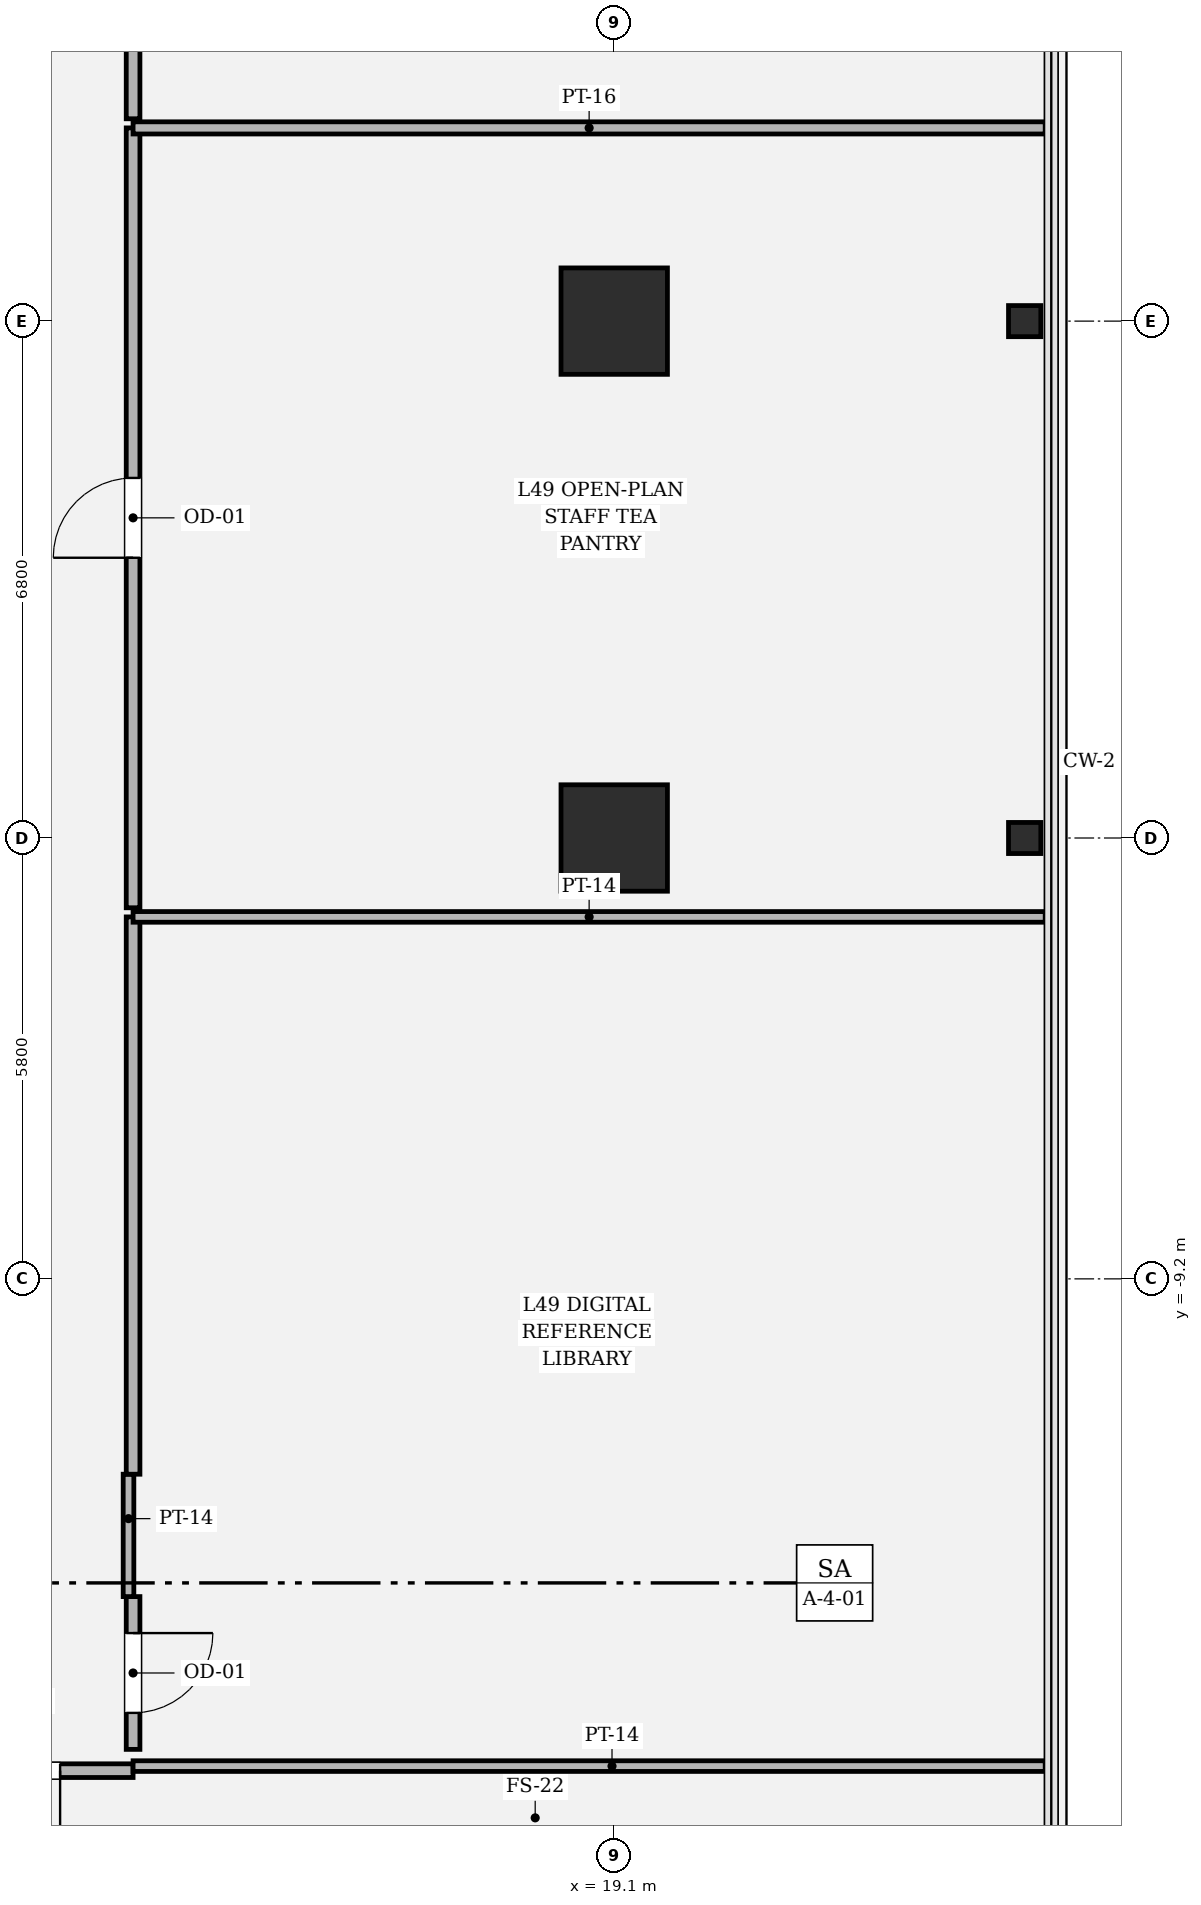
"""IFC4 building model, lengths in metres.
Left out: names, types, materials, properties, quantities, classifications, styles, units other than length and angle.
Written with IfcOpenShell. Run it as: python <this file> out.ifc"""

import sys

from ifc_helpers import new_model, si_unit, direction, frame, frame_2d, origin, origin_2d, place, context, subcontext, project, spatial, rectangle, hollow_rectangle, i_section, extrude, element, fill, save


model = new_model("IFC4")
c1 = context("Model", 3, precision=1e-05, world=origin(), true_north=direction((0.0, 1.0)))
c2 = subcontext(c1, "Body", "Model", "MODEL_VIEW")
j1 = project(units=[si_unit("LENGTHUNIT", "METRE"), si_unit("PLANEANGLEUNIT", "RADIAN")], contexts=[c1])
p1 = place(None, origin())
s1 = spatial("IfcSite", under=j1, at=p1, CompositionType="ELEMENT")
p2 = place(p1, origin())
s2 = spatial("IfcBuilding", under=s1, at=p2, CompositionType="ELEMENT")
p3 = place(p2, frame((0.0, 0.0, 208.65)))
s3 = spatial("IfcBuildingStorey", under=s2, at=p3, CompositionType="ELEMENT", Elevation=208.65)
for number, where, z_axis, x_axis in (
    (1, (19.1, -3.4, 0.0), (0.0, 0.0, 1.0), (1.0, 0.0, 0.0)),
    (2, (19.1, 3.4, 0.0), (0.0, 0.0, 1.0), (1.0, 0.0, 0.0)),
):
    element("IfcColumn", number, at=place(p3, frame(where, z_axis=z_axis, x_axis=x_axis)), inside=s3, PredefinedType="COLUMN", context=c2, shape_type="SweptSolid", body=[
        extrude(hollow_rectangle(XDim=1.4, YDim=1.4, WallThickness=0.042, at=origin_2d()), origin(), (0.0, 0.0, 1.0), 4.05),
    ])
for number, where, z_axis, x_axis in (
    (3, (24.5, -3.4, 0.0), (0.0, 0.0, 1.0), (0.0, 1.0, 0.0)),
    (4, (24.5, 3.4, 0.0), (0.0, 0.0, 1.0), (0.0, 1.0, 0.0)),
):
    element("IfcColumn", number, at=place(p3, frame(where, z_axis=z_axis, x_axis=x_axis)), inside=s3, PredefinedType="COLUMN", context=c2, shape_type="SweptSolid", body=[
        extrude(i_section(OverallWidth=0.409, OverallDepth=0.425, WebThickness=0.032, FlangeThickness=0.052, FilletRadius=0.018, at=origin_2d()), origin(), (0.0, 0.0, 1.0), 4.048),
    ])
p4 = place(p3, frame((9.8, -15.67, 0.0), z_axis=(0.0, 0.0, 1.0), x_axis=(1.0, 0.0, 0.0)))
e5 = element("IfcWall", 5, at=p4, inside=s3, PredefinedType="PARTITIONING", context=c2, shape_type="SweptSolid", body=[
    extrude(rectangle(XDim=2.97, YDim=0.18, at=frame_2d((1.485, 0.0))), origin(), (0.0, 0.0, 1.0), 3.174),
])
p5 = place(p4, frame((0.96, 0.0, 0.0)))
e6 = element("IfcOpeningElement", 6, at=p5, cuts=e5, PredefinedType="OPENING", context=c2, shape_type="SweptSolid", body=[
    extrude(rectangle(XDim=1.05, YDim=2.2, at=frame_2d((0.525, 1.1))), frame((0.0, 0.1, 0.0), z_axis=(0.0, -1.0, 0.0), x_axis=(1.0, 0.0, 0.0)), (0.0, 0.0, 1.0), 0.2),
])
p6 = place(p3, frame((12.77, -15.61, 0.0), z_axis=(0.0, 0.0, 1.0), x_axis=(1.0, 0.0, 0.0)))
e7 = element("IfcWall", 7, at=p6, inside=s3, PredefinedType="PARTITIONING", context=c2, shape_type="SweptSolid", body=[
    extrude(rectangle(XDim=12.0, YDim=0.14, at=frame_2d((6.0, 0.0))), origin(), (0.0, 0.0, 1.0), 2.544),
])
p7 = place(p3, frame((12.77, -15.39, 0.0), z_axis=(0.0, 0.0, 1.0), x_axis=(0.0, 1.0, 0.0)))
e8 = element("IfcWall", 8, at=p7, inside=s3, PredefinedType="PARTITIONING", context=c2, shape_type="SweptSolid", body=[
    extrude(rectangle(XDim=2.01, YDim=0.18, at=frame_2d((1.005, 0.0))), origin(), (0.0, 0.0, 1.0), 3.424),
])
p8 = place(p7, frame((0.48, 0.0, 0.0)))
e9 = element("IfcOpeningElement", 9, at=p8, cuts=e8, PredefinedType="OPENING", context=c2, shape_type="SweptSolid", body=[
    extrude(rectangle(XDim=1.05, YDim=2.2, at=frame_2d((0.525, 1.1))), frame((0.0, 0.1, 0.0), z_axis=(0.0, -1.0, 0.0), x_axis=(1.0, 0.0, 0.0)), (0.0, 0.0, 1.0), 0.2),
])
p9 = place(p3, frame((12.71, -13.38, 0.0), z_axis=(0.0, 0.0, 1.0), x_axis=(0.0, 1.0, 0.0)))
e10 = element("IfcWall", 10, at=p9, inside=s3, PredefinedType="PARTITIONING", context=c2, shape_type="SweptSolid", body=[
    extrude(rectangle(XDim=1.61, YDim=0.14, at=frame_2d((0.805, 0.0))), origin(), (0.0, 0.0, 1.0), 3.424),
])
p10 = place(p3, frame((12.77, -11.77, 0.0), z_axis=(0.0, 0.0, 1.0), x_axis=(0.0, 1.0, 0.0)))
e11 = element("IfcWall", 11, at=p10, inside=s3, PredefinedType="PARTITIONING", context=c2, shape_type="SweptSolid", body=[
    extrude(rectangle(XDim=7.332, YDim=0.18, at=frame_2d((3.666, 0.0))), origin(), (0.0, 0.0, 1.0), 3.174),
])
p11 = place(p3, frame((12.77, -4.438, 0.0), z_axis=(0.0, 0.0, 1.0), x_axis=(1.0, 0.0, 0.0)))
e12 = element("IfcWall", 12, at=p11, inside=s3, PredefinedType="PARTITIONING", context=c2, shape_type="SweptSolid", body=[
    extrude(rectangle(XDim=12.0, YDim=0.14, at=frame_2d((6.0, 0.0))), origin(), (0.0, 0.0, 1.0), 2.544),
])
p12 = place(p3, frame((12.77, -4.318, 0.0), z_axis=(0.0, 0.0, 1.0), x_axis=(0.0, 1.0, 0.0)))
e13 = element("IfcWall", 13, at=p12, inside=s3, PredefinedType="PARTITIONING", context=c2, shape_type="SweptSolid", body=[
    extrude(rectangle(XDim=10.26, YDim=0.18, at=frame_2d((5.13, 0.0))), origin(), (0.0, 0.0, 1.0), 3.174),
])
p13 = place(p12, frame((4.605, 0.0, 0.0)))
e14 = element("IfcOpeningElement", 14, at=p13, cuts=e13, PredefinedType="OPENING", context=c2, shape_type="SweptSolid", body=[
    extrude(rectangle(XDim=1.05, YDim=2.2, at=frame_2d((0.525, 1.1))), frame((0.0, 0.1, 0.0), z_axis=(0.0, -1.0, 0.0), x_axis=(1.0, 0.0, 0.0)), (0.0, 0.0, 1.0), 0.2),
])
p14 = place(p3, frame((12.77, 5.942, 0.0), z_axis=(0.0, 0.0, 1.0), x_axis=(1.0, 0.0, 0.0)))
e15 = element("IfcWall", 15, at=p14, inside=s3, PredefinedType="PARTITIONING", context=c2, shape_type="SweptSolid", body=[
    extrude(rectangle(XDim=12.0, YDim=0.16, at=frame_2d((6.0, 0.0))), origin(), (0.0, 0.0, 1.0), 2.544),
])
p15 = place(p3, frame((12.77, 6.062, 0.0), z_axis=(0.0, 0.0, 1.0), x_axis=(0.0, 1.0, 0.0)))
e16 = element("IfcWall", 16, at=p15, inside=s3, PredefinedType="PARTITIONING", context=c2, shape_type="SweptSolid", body=[
    extrude(rectangle(XDim=12.308, YDim=0.18, at=frame_2d((6.154, 0.0))), origin(), (0.0, 0.0, 1.0), 3.174),
])
p16 = place(p15, frame((5.629, 0.0, 0.0)))
e17 = element("IfcOpeningElement", 17, at=p16, cuts=e16, PredefinedType="OPENING", context=c2, shape_type="SweptSolid", body=[
    extrude(rectangle(XDim=1.05, YDim=2.2, at=frame_2d((0.525, 1.1))), frame((0.0, 0.1, 0.0), z_axis=(0.0, -1.0, 0.0), x_axis=(1.0, 0.0, 0.0)), (0.0, 0.0, 1.0), 0.2),
])
p17 = place(p5, origin())
e18 = element("IfcDoor", 18, at=p17, inside=s3, OperationType="SINGLE_SWING_RIGHT", PredefinedType="DOOR", context=c2, shape_type="SweptSolid", body=[
    extrude(rectangle(XDim=1.05, YDim=2.2, at=frame_2d((0.525, 1.1))), frame((0.0, 0.025, 0.0), z_axis=(0.0, -1.0, 0.0), x_axis=(1.0, 0.0, 0.0)), (0.0, 0.0, 1.0), 0.05),
])
fill(e6, e18)
p18 = place(p8, origin())
e19 = element("IfcDoor", 19, at=p18, inside=s3, OperationType="SINGLE_SWING_RIGHT", PredefinedType="DOOR", context=c2, shape_type="SweptSolid", body=[
    extrude(rectangle(XDim=1.05, YDim=2.2, at=frame_2d((0.525, 1.1))), frame((0.0, 0.025, 0.0), z_axis=(0.0, -1.0, 0.0), x_axis=(1.0, 0.0, 0.0)), (0.0, 0.0, 1.0), 0.05),
])
fill(e9, e19)
p19 = place(p13, origin())
e20 = element("IfcDoor", 20, at=p19, inside=s3, OperationType="SINGLE_SWING_LEFT", PredefinedType="DOOR", context=c2, shape_type="SweptSolid", body=[
    extrude(rectangle(XDim=1.05, YDim=2.2, at=frame_2d((0.525, 1.1))), frame((0.0, 0.025, 0.0), z_axis=(0.0, -1.0, 0.0), x_axis=(1.0, 0.0, 0.0)), (0.0, 0.0, 1.0), 0.05),
])
fill(e14, e20)
save(model, sys.argv[1])
